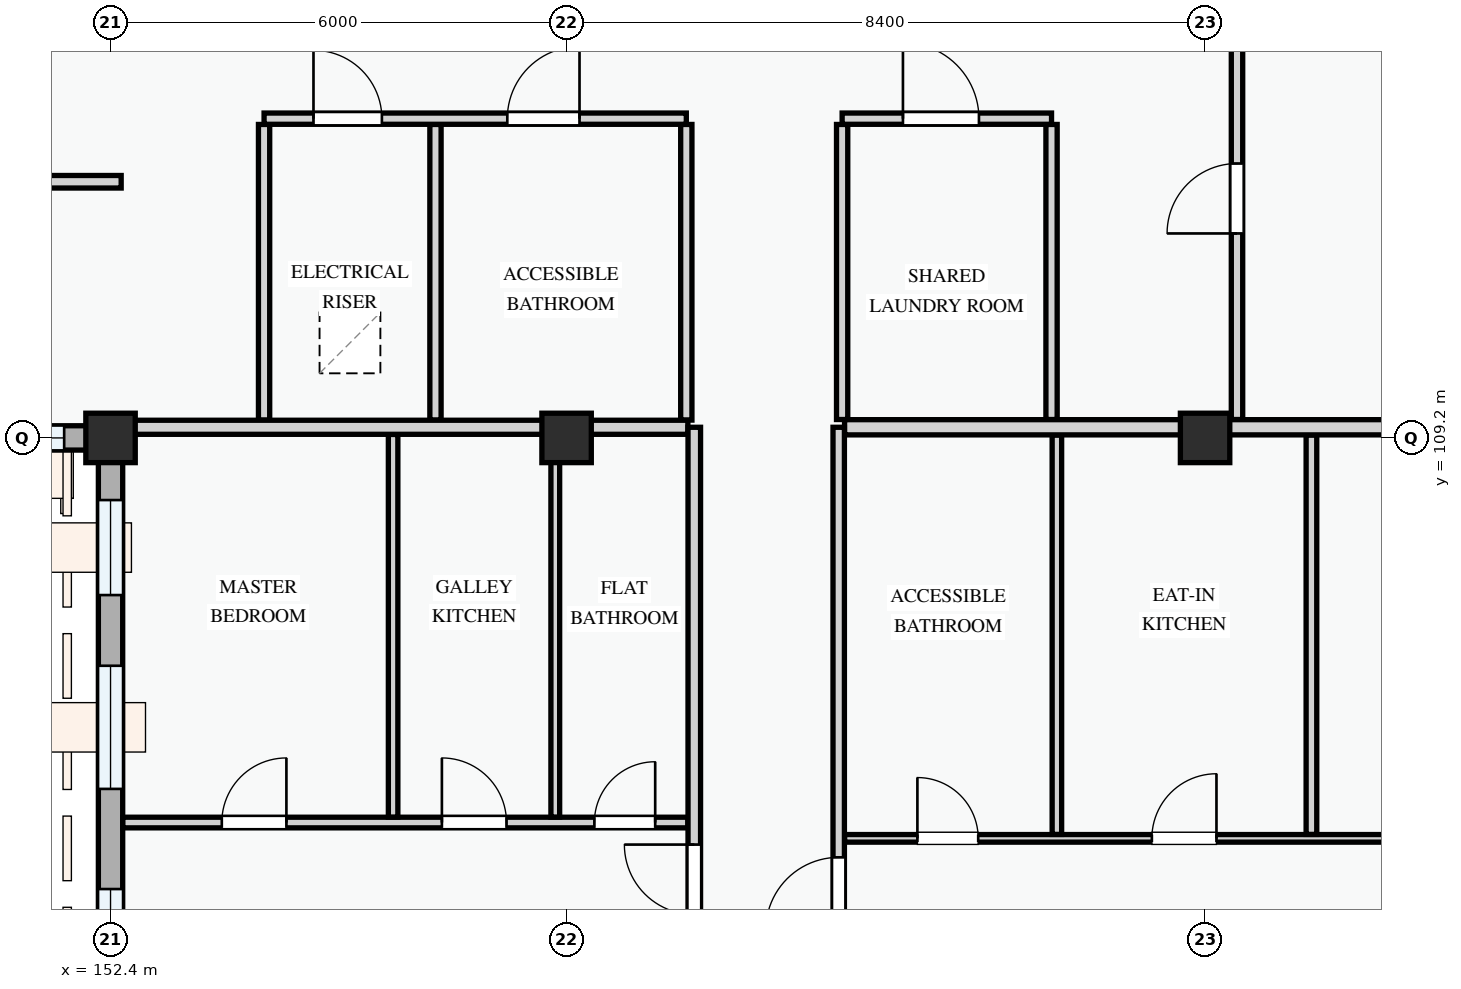
"""IFC4 building model, lengths in metres.
Left out: names, types, materials, properties, quantities, classifications, styles, units other than length and angle.
Written with IfcOpenShell. Run it as: python <this file> out.ifc"""

import sys

from ifc_helpers import new_model, si_unit, direction, frame, frame_2d, origin, origin_2d, place, context, subcontext, project, spatial, rectangle, extrude, element, fill, save


model = new_model("IFC4")
c1 = context("Model", 3, precision=1e-05, world=origin(), true_north=direction((0.0, 1.0)))
c2 = subcontext(c1, "Body", "Model", "MODEL_VIEW")
j1 = project(units=[si_unit("LENGTHUNIT", "METRE"), si_unit("PLANEANGLEUNIT", "RADIAN")], contexts=[c1])
p1 = place(None, origin())
s1 = spatial("IfcSite", under=j1, at=p1, CompositionType="ELEMENT")
p2 = place(p1, origin())
s2 = spatial("IfcBuilding", under=s1, at=p2, CompositionType="ELEMENT")
p3 = place(p2, frame((0.0, 0.0, 18.0)))
s3 = spatial("IfcBuildingStorey", under=s2, at=p3, CompositionType="ELEMENT", Elevation=18.0)
for number, where, z_axis, x_axis in (
    (1, (152.4, 109.2, 0.0), (0.0, 0.0, 1.0), (1.0, 0.0, 0.0)),
    (2, (158.4, 109.2, 0.0), (0.0, 0.0, 1.0), (1.0, 0.0, 0.0)),
    (3, (166.8, 109.2, 0.0), (0.0, 0.0, 1.0), (1.0, 0.0, 0.0)),
):
    element("IfcColumn", number, at=place(p3, frame(where, z_axis=z_axis, x_axis=x_axis)), inside=s3, PredefinedType="COLUMN", context=c2, shape_type="SweptSolid", body=[
        extrude(rectangle(XDim=0.65, YDim=0.65, at=origin_2d()), origin(), (0.0, 0.0, 1.0), 3.3),
    ])
p4 = place(p3, frame((144.0, 109.2, 0.0), z_axis=(0.0, 0.0, 1.0), x_axis=(1.0, 0.0, 0.0)))
e4 = element("IfcWall", 4, at=p4, inside=s3, PredefinedType="STANDARD", context=c2, shape_type="SweptSolid", body=[
    extrude(rectangle(XDim=8.4, YDim=0.32, at=frame_2d((4.2, 0.0))), origin(), (0.0, 0.0, 1.0), 2.375),
])
p5 = place(p4, frame((0.6, 0.0, 0.78)))
e5 = element("IfcOpeningElement", 5, at=p5, cuts=e4, PredefinedType="OPENING", context=c2, shape_type="SweptSolid", body=[
    extrude(rectangle(XDim=2.18, YDim=1.48, at=frame_2d((1.09, 0.74))), frame((0.0, 0.17, 0.0), z_axis=(0.0, -1.0, 0.0), x_axis=(1.0, 0.0, 0.0)), (0.0, 0.0, 1.0), 0.34),
])
p6 = place(p4, frame((3.9, 0.0, 0.78)))
e6 = element("IfcOpeningElement", 6, at=p6, cuts=e4, PredefinedType="OPENING", context=c2, shape_type="SweptSolid", body=[
    extrude(rectangle(XDim=1.3, YDim=1.4, at=frame_2d((0.65, 0.7))), frame((0.0, 0.17, 0.0), z_axis=(0.0, -1.0, 0.0), x_axis=(1.0, 0.0, 0.0)), (0.0, 0.0, 1.0), 0.34),
])
p7 = place(p4, frame((6.47, 0.0, 0.78)))
e7 = element("IfcOpeningElement", 7, at=p7, cuts=e4, PredefinedType="OPENING", context=c2, shape_type="SweptSolid", body=[
    extrude(rectangle(XDim=1.32, YDim=1.35, at=frame_2d((0.66, 0.675))), frame((0.0, 0.17, 0.0), z_axis=(0.0, -1.0, 0.0), x_axis=(1.0, 0.0, 0.0)), (0.0, 0.0, 1.0), 0.34),
])
p8 = place(p3, frame((152.4, 109.2, 0.0), z_axis=(0.0, 0.0, 1.0), x_axis=(0.0, -1.0, 0.0)))
e8 = element("IfcWall", 8, at=p8, inside=s3, PredefinedType="STANDARD", context=c2, shape_type="SweptSolid", body=[
    extrude(rectangle(XDim=8.4, YDim=0.32, at=frame_2d((4.2, 0.0))), origin(), (0.0, 0.0, 1.0), 2.425),
])
p9 = place(p8, frame((0.817, 0.0, 0.78)))
e9 = element("IfcOpeningElement", 9, at=p9, cuts=e8, PredefinedType="OPENING", context=c2, shape_type="SweptSolid", body=[
    extrude(rectangle(XDim=1.25, YDim=1.45, at=frame_2d((0.625, 0.725))), frame((0.0, 0.17, 0.0), z_axis=(0.0, -1.0, 0.0), x_axis=(1.0, 0.0, 0.0)), (0.0, 0.0, 1.0), 0.34),
])
p10 = place(p8, frame((2.998, 0.0, 0.78)))
e10 = element("IfcOpeningElement", 10, at=p10, cuts=e8, PredefinedType="OPENING", context=c2, shape_type="SweptSolid", body=[
    extrude(rectangle(XDim=1.62, YDim=1.38, at=frame_2d((0.81, 0.69))), frame((0.0, 0.17, 0.0), z_axis=(0.0, -1.0, 0.0), x_axis=(1.0, 0.0, 0.0)), (0.0, 0.0, 1.0), 0.34),
])
p11 = place(p8, frame((5.935, 0.0, 0.78)))
e11 = element("IfcOpeningElement", 11, at=p11, cuts=e8, PredefinedType="OPENING", context=c2, shape_type="SweptSolid", body=[
    extrude(rectangle(XDim=1.4, YDim=1.45, at=frame_2d((0.7, 0.725))), frame((0.0, 0.17, 0.0), z_axis=(0.0, -1.0, 0.0), x_axis=(1.0, 0.0, 0.0)), (0.0, 0.0, 1.0), 0.34),
])
for number, where, z_axis, x_axis in (
    (12, (154.42, 113.324, 0.0), (0.0, 0.0, 1.0), (0.0, -1.0, 0.0)),
    (13, (156.675, 113.324, 0.0), (0.0, 0.0, 1.0), (0.0, -1.0, 0.0)),
    (14, (159.975, 113.324, 0.0), (0.0, 0.0, 1.0), (0.0, -1.0, 0.0)),
):
    element("IfcWall", number, at=place(p3, frame(where, z_axis=z_axis, x_axis=x_axis)), inside=s3, PredefinedType="PARTITIONING", context=c2, shape_type="SweptSolid", body=[
        extrude(rectangle(XDim=3.889, YDim=0.148, at=frame_2d((1.945, 0.0))), origin(), (0.0, 0.0, 1.0), 3.0),
    ])
for number, where, z_axis, x_axis in (
    (15, (162.025, 113.324, 0.0), (0.0, 0.0, 1.0), (0.0, -1.0, 0.0)),
    (16, (164.78, 113.324, 0.0), (0.0, 0.0, 1.0), (0.0, -1.0, 0.0)),
):
    element("IfcWall", number, at=place(p3, frame(where, z_axis=z_axis, x_axis=x_axis)), inside=s3, PredefinedType="PARTITIONING", context=c2, shape_type="SweptSolid", body=[
        extrude(rectangle(XDim=3.882, YDim=0.148, at=frame_2d((1.941, 0.0))), origin(), (0.0, 0.0, 1.0), 3.0),
    ])
p12 = place(p3, frame((154.42, 113.4, 0.0), z_axis=(0.0, 0.0, 1.0), x_axis=(1.0, 0.0, 0.0)))
e17 = element("IfcWall", 17, at=p12, inside=s3, PredefinedType="PARTITIONING", context=c2, shape_type="SweptSolid", body=[
    extrude(rectangle(XDim=5.555, YDim=0.148, at=frame_2d((2.778, 0.0))), origin(), (0.0, 0.0, 1.0), 3.0),
])
p13 = place(p12, frame((0.65, 0.0, 0.0)))
e18 = element("IfcOpeningElement", 18, at=p13, cuts=e17, PredefinedType="OPENING", context=c2, shape_type="SweptSolid", body=[
    extrude(rectangle(XDim=0.9, YDim=2.1, at=frame_2d((0.45, 1.05))), frame((0.0, 0.084, 0.0), z_axis=(0.0, -1.0, 0.0), x_axis=(1.0, 0.0, 0.0)), (0.0, 0.0, 1.0), 0.168),
])
p14 = place(p12, frame((3.2, 0.0, 0.0)))
e19 = element("IfcOpeningElement", 19, at=p14, cuts=e17, PredefinedType="OPENING", context=c2, shape_type="SweptSolid", body=[
    extrude(rectangle(XDim=0.95, YDim=2.1, at=frame_2d((0.475, 1.05))), frame((0.0, 0.084, 0.0), z_axis=(0.0, -1.0, 0.0), x_axis=(1.0, 0.0, 0.0)), (0.0, 0.0, 1.0), 0.168),
])
p15 = place(p3, frame((162.025, 113.4, 0.0), z_axis=(0.0, 0.0, 1.0), x_axis=(1.0, 0.0, 0.0)))
e20 = element("IfcWall", 20, at=p15, inside=s3, PredefinedType="PARTITIONING", context=c2, shape_type="SweptSolid", body=[
    extrude(rectangle(XDim=2.755, YDim=0.148, at=frame_2d((1.377, 0.0))), origin(), (0.0, 0.0, 1.0), 3.0),
])
p16 = place(p15, frame((0.8, 0.0, 0.0)))
e21 = element("IfcOpeningElement", 21, at=p16, cuts=e20, PredefinedType="OPENING", context=c2, shape_type="SweptSolid", body=[
    extrude(rectangle(XDim=1.0, YDim=2.15, at=frame_2d((0.5, 1.075))), frame((0.0, 0.084, 0.0), z_axis=(0.0, -1.0, 0.0), x_axis=(1.0, 0.0, 0.0)), (0.0, 0.0, 1.0), 0.168),
])
p17 = place(p3, frame((150.127, 112.57, 0.0), z_axis=(0.0, 0.0, 1.0), x_axis=(1.0, 0.0, 0.0)))
e22 = element("IfcWall", 22, at=p17, inside=s3, PredefinedType="PARTITIONING", context=c2, shape_type="SweptSolid", body=[
    extrude(rectangle(XDim=2.413, YDim=0.165, at=frame_2d((1.207, 0.0))), origin(), (0.0, 0.0, 1.0), 3.0),
])
p18 = place(p3, frame((167.22, 109.442, 0.0), z_axis=(0.0, 0.0, 1.0), x_axis=(0.0, 1.0, 0.0)))
e23 = element("IfcWall", 23, at=p18, inside=s3, PredefinedType="PARTITIONING", context=c2, shape_type="SweptSolid", body=[
    extrude(rectangle(XDim=14.018, YDim=0.15, at=frame_2d((7.009, 0.0))), origin(), (0.0, 0.0, 1.0), 2.425),
])
p19 = place(p18, frame((2.448, 0.0, 0.0)))
e24 = element("IfcOpeningElement", 24, at=p19, cuts=e23, PredefinedType="OPENING", context=c2, shape_type="SweptSolid", body=[
    extrude(rectangle(XDim=0.92, YDim=2.1, at=frame_2d((0.46, 1.05))), frame((0.0, 0.085, 0.0), z_axis=(0.0, -1.0, 0.0), x_axis=(1.0, 0.0, 0.0)), (0.0, 0.0, 1.0), 0.17),
])
p20 = place(p3, frame((152.562, 104.14, 0.0), z_axis=(0.0, 0.0, 1.0), x_axis=(1.0, 0.0, 0.0)))
e25 = element("IfcWall", 25, at=p20, inside=s3, PredefinedType="PARTITIONING", context=c2, shape_type="SweptSolid", body=[
    extrude(rectangle(XDim=7.434, YDim=0.14, at=frame_2d((3.717, 0.0))), origin(), (0.0, 0.0, 1.0), 3.0),
])
p21 = place(p20, frame((1.302, 0.0, 0.0)))
e26 = element("IfcOpeningElement", 26, at=p21, cuts=e25, PredefinedType="OPENING", context=c2, shape_type="SweptSolid", body=[
    extrude(rectangle(XDim=0.85, YDim=2.1, at=frame_2d((0.425, 1.05))), frame((0.0, 0.08, 0.0), z_axis=(0.0, -1.0, 0.0), x_axis=(1.0, 0.0, 0.0)), (0.0, 0.0, 1.0), 0.16),
])
p22 = place(p20, frame((4.198, 0.0, 0.0)))
e27 = element("IfcOpeningElement", 27, at=p22, cuts=e25, PredefinedType="OPENING", context=c2, shape_type="SweptSolid", body=[
    extrude(rectangle(XDim=0.85, YDim=2.1, at=frame_2d((0.425, 1.05))), frame((0.0, 0.08, 0.0), z_axis=(0.0, -1.0, 0.0), x_axis=(1.0, 0.0, 0.0)), (0.0, 0.0, 1.0), 0.16),
])
p23 = place(p20, frame((6.204, 0.0, 0.0)))
e28 = element("IfcOpeningElement", 28, at=p23, cuts=e25, PredefinedType="OPENING", context=c2, shape_type="SweptSolid", body=[
    extrude(rectangle(XDim=0.8, YDim=2.1, at=frame_2d((0.4, 1.05))), frame((0.0, 0.08, 0.0), z_axis=(0.0, -1.0, 0.0), x_axis=(1.0, 0.0, 0.0)), (0.0, 0.0, 1.0), 0.16),
])
p24 = place(p3, frame((156.118, 104.212, 0.0), z_axis=(0.0, 0.0, 1.0), x_axis=(0.0, 1.0, 0.0)))
e29 = element("IfcWall", 29, at=p24, inside=s3, PredefinedType="PARTITIONING", context=c2, shape_type="SweptSolid", body=[
    extrude(rectangle(XDim=5.034, YDim=0.125, at=frame_2d((2.517, 0.0))), origin(), (0.0, 0.0, 1.0), 3.0),
])
p25 = place(p3, frame((158.251, 104.212, 0.0), z_axis=(0.0, 0.0, 1.0), x_axis=(0.0, 1.0, 0.0)))
e30 = element("IfcWall", 30, at=p25, inside=s3, PredefinedType="PARTITIONING", context=c2, shape_type="SweptSolid", body=[
    extrude(rectangle(XDim=5.034, YDim=0.115, at=frame_2d((2.517, 0.0))), origin(), (0.0, 0.0, 1.0), 2.425),
])
p26 = place(p3, frame((162.057, 103.932, 0.0), z_axis=(0.0, 0.0, 1.0), x_axis=(1.0, 0.0, 0.0)))
e31 = element("IfcWall", 31, at=p26, inside=s3, PredefinedType="PARTITIONING", context=c2, shape_type="SweptSolid", body=[
    extrude(rectangle(XDim=11.781, YDim=0.1, at=frame_2d((5.891, 0.0))), origin(), (0.0, 0.0, 1.0), 3.0),
])
p27 = place(p26, frame((0.958, 0.0, 0.0)))
e32 = element("IfcOpeningElement", 32, at=p27, cuts=e31, PredefinedType="OPENING", context=c2, shape_type="SweptSolid", body=[
    extrude(rectangle(XDim=0.8, YDim=2.1, at=frame_2d((0.4, 1.05))), frame((0.0, 0.06, 0.0), z_axis=(0.0, -1.0, 0.0), x_axis=(1.0, 0.0, 0.0)), (0.0, 0.0, 1.0), 0.12),
])
p28 = place(p26, frame((4.043, 0.0, 0.0)))
e33 = element("IfcOpeningElement", 33, at=p28, cuts=e31, PredefinedType="OPENING", context=c2, shape_type="SweptSolid", body=[
    extrude(rectangle(XDim=0.85, YDim=2.1, at=frame_2d((0.425, 1.05))), frame((0.0, 0.06, 0.0), z_axis=(0.0, -1.0, 0.0), x_axis=(1.0, 0.0, 0.0)), (0.0, 0.0, 1.0), 0.12),
])
p29 = place(p26, frame((8.588, 0.0, 0.0)))
e34 = element("IfcOpeningElement", 34, at=p29, cuts=e31, PredefinedType="OPENING", context=c2, shape_type="SweptSolid", body=[
    extrude(rectangle(XDim=0.85, YDim=2.1, at=frame_2d((0.425, 1.05))), frame((0.0, 0.06, 0.0), z_axis=(0.0, -1.0, 0.0), x_axis=(1.0, 0.0, 0.0)), (0.0, 0.0, 1.0), 0.12),
])
p30 = place(p3, frame((168.199, 103.984, 0.0), z_axis=(0.0, 0.0, 1.0), x_axis=(0.0, 1.0, 0.0)))
e35 = element("IfcWall", 35, at=p30, inside=s3, PredefinedType="PARTITIONING", context=c2, shape_type="SweptSolid", body=[
    extrude(rectangle(XDim=5.254, YDim=0.14, at=frame_2d((2.627, 0.0))), origin(), (0.0, 0.0, 1.0), 3.0),
])
p31 = place(p3, frame((164.85, 103.984, 0.0), z_axis=(0.0, 0.0, 1.0), x_axis=(0.0, 1.0, 0.0)))
e36 = element("IfcWall", 36, at=p31, inside=s3, PredefinedType="PARTITIONING", context=c2, shape_type="SweptSolid", body=[
    extrude(rectangle(XDim=5.254, YDim=0.125, at=frame_2d((2.627, 0.0))), origin(), (0.0, 0.0, 1.0), 3.0),
])
p32 = place(p3, frame((152.46, 109.34, 0.0), z_axis=(0.0, 0.0, 1.0), x_axis=(1.0, 0.0, 0.0)))
e37 = element("IfcWall", 37, at=p32, inside=s3, PredefinedType="PARTITIONING", context=c2, shape_type="SweptSolid", body=[
    extrude(rectangle(XDim=7.536, YDim=0.185, at=frame_2d((3.768, 0.0))), origin(), (0.0, 0.0, 1.0), 2.375),
])
p33 = place(p3, frame((162.057, 109.34, 0.0), z_axis=(0.0, 0.0, 1.0), x_axis=(1.0, 0.0, 0.0)))
e38 = element("IfcWall", 38, at=p33, inside=s3, PredefinedType="PARTITIONING", context=c2, shape_type="SweptSolid", body=[
    extrude(rectangle(XDim=11.781, YDim=0.2, at=frame_2d((5.891, 0.0))), origin(), (0.0, 0.0, 1.0), 2.375),
])
p34 = place(p3, frame((160.08, 80.46, 0.0), z_axis=(0.0, 0.0, 1.0), x_axis=(0.0, 1.0, 0.0)))
e39 = element("IfcWall", 39, at=p34, inside=s3, PredefinedType="PARTITIONING", context=c2, shape_type="SweptSolid", body=[
    extrude(rectangle(XDim=28.88, YDim=0.165, at=frame_2d((14.44, 0.0))), origin(), (0.0, 0.0, 1.0), 3.0),
])
p35 = place(p34, frame((2.419, 0.0, 0.0)))
e40 = element("IfcOpeningElement", 40, at=p35, cuts=e39, PredefinedType="OPENING", context=c2, shape_type="SweptSolid", body=[
    extrude(rectangle(XDim=0.96, YDim=2.12, at=frame_2d((0.48, 1.06))), frame((0.0, 0.093, 0.0), z_axis=(0.0, -1.0, 0.0), x_axis=(1.0, 0.0, 0.0)), (0.0, 0.0, 1.0), 0.185),
])
p36 = place(p34, frame((9.676, 0.0, 0.0)))
e41 = element("IfcOpeningElement", 41, at=p36, cuts=e39, PredefinedType="OPENING", context=c2, shape_type="SweptSolid", body=[
    extrude(rectangle(XDim=0.92, YDim=2.1, at=frame_2d((0.46, 1.05))), frame((0.0, 0.093, 0.0), z_axis=(0.0, -1.0, 0.0), x_axis=(1.0, 0.0, 0.0)), (0.0, 0.0, 1.0), 0.185),
])
p37 = place(p34, frame((22.47, 0.0, 0.0)))
e42 = element("IfcOpeningElement", 42, at=p37, cuts=e39, PredefinedType="OPENING", context=c2, shape_type="SweptSolid", body=[
    extrude(rectangle(XDim=0.92, YDim=2.1, at=frame_2d((0.46, 1.05))), frame((0.0, 0.093, 0.0), z_axis=(0.0, -1.0, 0.0), x_axis=(1.0, 0.0, 0.0)), (0.0, 0.0, 1.0), 0.185),
])
p38 = place(p3, frame((161.98, 80.46, 0.0), z_axis=(0.0, 0.0, 1.0), x_axis=(0.0, 1.0, 0.0)))
e43 = element("IfcWall", 43, at=p38, inside=s3, PredefinedType="PARTITIONING", context=c2, shape_type="SweptSolid", body=[
    extrude(rectangle(XDim=28.88, YDim=0.15, at=frame_2d((14.44, 0.0))), origin(), (0.0, 0.0, 1.0), 3.0),
])
p39 = place(p38, frame((2.441, 0.0, 0.0)))
e44 = element("IfcOpeningElement", 44, at=p39, cuts=e43, PredefinedType="OPENING", context=c2, shape_type="SweptSolid", body=[
    extrude(rectangle(XDim=0.92, YDim=2.1, at=frame_2d((0.46, 1.05))), frame((0.0, 0.085, 0.0), z_axis=(0.0, -1.0, 0.0), x_axis=(1.0, 0.0, 0.0)), (0.0, 0.0, 1.0), 0.17),
])
p40 = place(p38, frame((9.677, 0.0, 0.0)))
e45 = element("IfcOpeningElement", 45, at=p40, cuts=e43, PredefinedType="OPENING", context=c2, shape_type="SweptSolid", body=[
    extrude(rectangle(XDim=0.92, YDim=2.1, at=frame_2d((0.46, 1.05))), frame((0.0, 0.085, 0.0), z_axis=(0.0, -1.0, 0.0), x_axis=(1.0, 0.0, 0.0)), (0.0, 0.0, 1.0), 0.17),
])
p41 = place(p38, frame((22.262, 0.0, 0.0)))
e46 = element("IfcOpeningElement", 46, at=p41, cuts=e43, PredefinedType="OPENING", context=c2, shape_type="SweptSolid", body=[
    extrude(rectangle(XDim=0.96, YDim=2.12, at=frame_2d((0.48, 1.06))), frame((0.0, 0.085, 0.0), z_axis=(0.0, -1.0, 0.0), x_axis=(1.0, 0.0, 0.0)), (0.0, 0.0, 1.0), 0.17),
])
p42 = place(p7, origin())
e47 = element("IfcWindow", 47, at=p42, inside=s3, PartitioningType="SINGLE_PANEL", PredefinedType="WINDOW", context=c2, shape_type="SweptSolid", body=[
    extrude(rectangle(XDim=1.32, YDim=1.35, at=frame_2d((0.66, 0.675))), frame((0.0, 0.03, 0.0), z_axis=(0.0, -1.0, 0.0), x_axis=(1.0, 0.0, 0.0)), (0.0, 0.0, 1.0), 0.06),
])
fill(e7, e47)
p43 = place(p9, origin())
e48 = element("IfcWindow", 48, at=p43, inside=s3, PartitioningType="SINGLE_PANEL", PredefinedType="WINDOW", context=c2, shape_type="SweptSolid", body=[
    extrude(rectangle(XDim=1.25, YDim=1.45, at=frame_2d((0.625, 0.725))), frame((0.0, 0.03, 0.0), z_axis=(0.0, -1.0, 0.0), x_axis=(1.0, 0.0, 0.0)), (0.0, 0.0, 1.0), 0.06),
])
fill(e9, e48)
p44 = place(p10, origin())
e49 = element("IfcWindow", 49, at=p44, inside=s3, PartitioningType="DOUBLE_PANEL_VERTICAL", PredefinedType="WINDOW", context=c2, shape_type="SweptSolid", body=[
    extrude(rectangle(XDim=1.62, YDim=1.38, at=frame_2d((0.81, 0.69))), frame((0.0, 0.03, 0.0), z_axis=(0.0, -1.0, 0.0), x_axis=(1.0, 0.0, 0.0)), (0.0, 0.0, 1.0), 0.06),
])
fill(e10, e49)
p45 = place(p11, origin())
e50 = element("IfcWindow", 50, at=p45, inside=s3, PartitioningType="SINGLE_PANEL", PredefinedType="WINDOW", context=c2, shape_type="SweptSolid", body=[
    extrude(rectangle(XDim=1.4, YDim=1.45, at=frame_2d((0.7, 0.725))), frame((0.0, 0.03, 0.0), z_axis=(0.0, -1.0, 0.0), x_axis=(1.0, 0.0, 0.0)), (0.0, 0.0, 1.0), 0.06),
])
fill(e11, e50)
p46 = place(p13, origin())
e51 = element("IfcDoor", 51, at=p46, inside=s3, OperationType="SINGLE_SWING_LEFT", PredefinedType="DOOR", context=c2, shape_type="SweptSolid", body=[
    extrude(rectangle(XDim=0.9, YDim=2.1, at=frame_2d((0.45, 1.05))), frame((0.0, 0.025, 0.0), z_axis=(0.0, -1.0, 0.0), x_axis=(1.0, 0.0, 0.0)), (0.0, 0.0, 1.0), 0.05),
])
fill(e18, e51)
p47 = place(p14, origin())
e52 = element("IfcDoor", 52, at=p47, inside=s3, OperationType="SINGLE_SWING_RIGHT", PredefinedType="DOOR", context=c2, shape_type="SweptSolid", body=[
    extrude(rectangle(XDim=0.95, YDim=2.1, at=frame_2d((0.475, 1.05))), frame((0.0, 0.025, 0.0), z_axis=(0.0, -1.0, 0.0), x_axis=(1.0, 0.0, 0.0)), (0.0, 0.0, 1.0), 0.05),
])
fill(e19, e52)
p48 = place(p16, origin())
e53 = element("IfcDoor", 53, at=p48, inside=s3, OperationType="SINGLE_SWING_LEFT", PredefinedType="DOOR", context=c2, shape_type="SweptSolid", body=[
    extrude(rectangle(XDim=1.0, YDim=2.15, at=frame_2d((0.5, 1.075))), frame((0.0, 0.025, 0.0), z_axis=(0.0, -1.0, 0.0), x_axis=(1.0, 0.0, 0.0)), (0.0, 0.0, 1.0), 0.05),
])
fill(e21, e53)
p49 = place(p19, origin())
e54 = element("IfcDoor", 54, at=p49, inside=s3, OperationType="SINGLE_SWING_LEFT", PredefinedType="DOOR", context=c2, shape_type="SweptSolid", body=[
    extrude(rectangle(XDim=0.92, YDim=2.1, at=frame_2d((0.46, 1.05))), frame((0.0, 0.025, 0.0), z_axis=(0.0, -1.0, 0.0), x_axis=(1.0, 0.0, 0.0)), (0.0, 0.0, 1.0), 0.05),
])
fill(e24, e54)
p50 = place(p21, origin())
e55 = element("IfcDoor", 55, at=p50, inside=s3, OperationType="SINGLE_SWING_RIGHT", PredefinedType="DOOR", context=c2, shape_type="SweptSolid", body=[
    extrude(rectangle(XDim=0.85, YDim=2.1, at=frame_2d((0.425, 1.05))), frame((0.0, 0.025, 0.0), z_axis=(0.0, -1.0, 0.0), x_axis=(1.0, 0.0, 0.0)), (0.0, 0.0, 1.0), 0.05),
])
fill(e26, e55)
p51 = place(p22, origin())
e56 = element("IfcDoor", 56, at=p51, inside=s3, OperationType="SINGLE_SWING_LEFT", PredefinedType="DOOR", context=c2, shape_type="SweptSolid", body=[
    extrude(rectangle(XDim=0.85, YDim=2.1, at=frame_2d((0.425, 1.05))), frame((0.0, 0.025, 0.0), z_axis=(0.0, -1.0, 0.0), x_axis=(1.0, 0.0, 0.0)), (0.0, 0.0, 1.0), 0.05),
])
fill(e27, e56)
p52 = place(p23, origin())
e57 = element("IfcDoor", 57, at=p52, inside=s3, OperationType="SINGLE_SWING_RIGHT", PredefinedType="DOOR", context=c2, shape_type="SweptSolid", body=[
    extrude(rectangle(XDim=0.8, YDim=2.1, at=frame_2d((0.4, 1.05))), frame((0.0, 0.025, 0.0), z_axis=(0.0, -1.0, 0.0), x_axis=(1.0, 0.0, 0.0)), (0.0, 0.0, 1.0), 0.05),
])
fill(e28, e57)
p53 = place(p27, origin())
e58 = element("IfcDoor", 58, at=p53, inside=s3, OperationType="SINGLE_SWING_LEFT", PredefinedType="DOOR", context=c2, shape_type="SweptSolid", body=[
    extrude(rectangle(XDim=0.8, YDim=2.1, at=frame_2d((0.4, 1.05))), frame((0.0, 0.025, 0.0), z_axis=(0.0, -1.0, 0.0), x_axis=(1.0, 0.0, 0.0)), (0.0, 0.0, 1.0), 0.05),
])
fill(e32, e58)
p54 = place(p28, origin())
e59 = element("IfcDoor", 59, at=p54, inside=s3, OperationType="SINGLE_SWING_RIGHT", PredefinedType="DOOR", context=c2, shape_type="SweptSolid", body=[
    extrude(rectangle(XDim=0.85, YDim=2.1, at=frame_2d((0.425, 1.05))), frame((0.0, 0.025, 0.0), z_axis=(0.0, -1.0, 0.0), x_axis=(1.0, 0.0, 0.0)), (0.0, 0.0, 1.0), 0.05),
])
fill(e33, e59)
p55 = place(p37, origin())
e60 = element("IfcDoor", 60, at=p55, inside=s3, OperationType="SINGLE_SWING_RIGHT", PredefinedType="DOOR", context=c2, shape_type="SweptSolid", body=[
    extrude(rectangle(XDim=0.92, YDim=2.1, at=frame_2d((0.46, 1.05))), frame((0.0, 0.025, 0.0), z_axis=(0.0, -1.0, 0.0), x_axis=(1.0, 0.0, 0.0)), (0.0, 0.0, 1.0), 0.05),
])
fill(e42, e60)
p56 = place(p41, origin())
e61 = element("IfcDoor", 61, at=p56, inside=s3, OperationType="SINGLE_SWING_LEFT", PredefinedType="DOOR", context=c2, shape_type="SweptSolid", body=[
    extrude(rectangle(XDim=0.96, YDim=2.12, at=frame_2d((0.48, 1.06))), frame((0.0, 0.025, 0.0), z_axis=(0.0, -1.0, 0.0), x_axis=(1.0, 0.0, 0.0)), (0.0, 0.0, 1.0), 0.05),
])
fill(e46, e61)
save(model, sys.argv[1])
